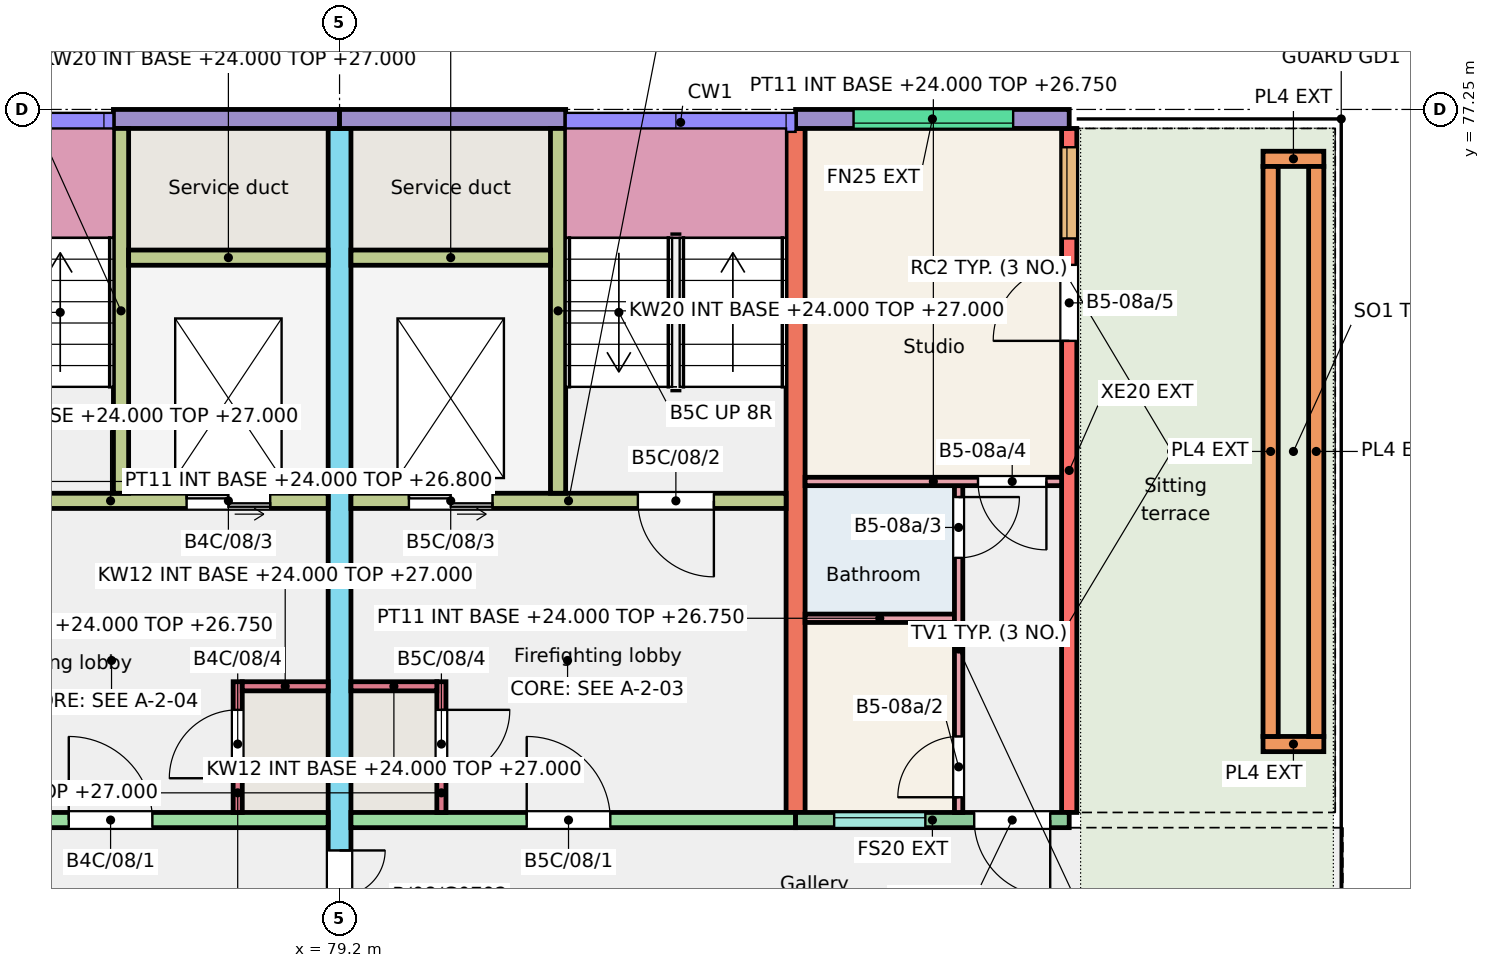
"""IFC4 building model, lengths in metres.
Left out: names, types, materials, properties, quantities, classifications, styles, units other than length and angle.
Written with IfcOpenShell. Run it as: python <this file> out.ifc"""

import sys

from ifc_helpers import new_model, si_unit, direction, frame, frame_2d, origin, place, context, subcontext, project, spatial, rectangle, extrude, element, fill, save


model = new_model("IFC4")
c1 = context("Model", 3, precision=1e-05, world=origin(), true_north=direction((0.0, 1.0)))
c2 = subcontext(c1, "Body", "Model", "MODEL_VIEW")
j1 = project(units=[si_unit("LENGTHUNIT", "METRE"), si_unit("PLANEANGLEUNIT", "RADIAN")], contexts=[c1])
p1 = place(None, origin())
s1 = spatial("IfcSite", under=j1, at=p1, CompositionType="ELEMENT")
p2 = place(p1, origin())
s2 = spatial("IfcBuilding", under=s1, at=p2, CompositionType="ELEMENT")
p3 = place(p2, frame((0.0, 0.0, 24.0)))
s3 = spatial("IfcBuildingStorey", under=s2, at=p3, CompositionType="ELEMENT", Elevation=24.0)
p4 = place(p3, frame((79.2, 66.0, 0.0), z_axis=(0.0, 0.0, 1.0), x_axis=(0.0, 1.0, 0.0)))
e1 = element("IfcWall", 1, at=p4, inside=s3, PredefinedType="SHEAR", context=c2, shape_type="SweptSolid", body=[
    extrude(rectangle(XDim=11.0, YDim=0.3, at=frame_2d((5.5, 0.0))), origin(), (0.0, 0.0, 1.0), 3.0),
])
p5 = place(p4, frame((0.3, 0.0, 0.0)))
e2 = element("IfcOpeningElement", 2, at=p5, cuts=e1, PredefinedType="OPENING", context=c2, shape_type="SweptSolid", body=[
    extrude(rectangle(XDim=1.2, YDim=2.1, at=frame_2d((0.6, 1.05))), frame((0.0, 0.16, 0.0), z_axis=(0.0, -1.0, 0.0), x_axis=(1.0, 0.0, 0.0)), (0.0, 0.0, 1.0), 0.32),
])
p6 = place(p3, frame((85.2, 68.0, 0.0), z_axis=(0.0, 0.0, 1.0), x_axis=(0.0, 1.0, 0.0)))
e3 = element("IfcWall", 3, at=p6, inside=s3, PredefinedType="SHEAR", context=c2, shape_type="SweptSolid", body=[
    extrude(rectangle(XDim=9.0, YDim=0.25, at=frame_2d((4.5, 0.0))), origin(), (0.0, 0.0, 1.0), 3.0),
])
p7 = place(p3, frame((88.8, 68.0, 0.0), z_axis=(0.0, 0.0, 1.0), x_axis=(0.0, 1.0, 0.0)))
e4 = element("IfcWall", 4, at=p7, inside=s3, PredefinedType="SHEAR", context=c2, shape_type="SweptSolid", body=[
    extrude(rectangle(XDim=9.0, YDim=0.2, at=frame_2d((4.5, 0.0))), origin(), (0.0, 0.0, 1.0), 3.0),
])
p8 = place(p7, frame((7.552, 0.0, 0.9)))
e5 = element("IfcOpeningElement", 5, at=p8, cuts=e4, PredefinedType="OPENING", context=c2, shape_type="SweptSolid", body=[
    extrude(rectangle(XDim=1.2, YDim=1.5, at=frame_2d((0.6, 0.75))), frame((0.0, 0.11, 0.0), z_axis=(0.0, -1.0, 0.0), x_axis=(1.0, 0.0, 0.0)), (0.0, 0.0, 1.0), 0.22),
])
p9 = place(p7, frame((6.205, 0.0, 0.0)))
e6 = element("IfcOpeningElement", 6, at=p9, cuts=e4, PredefinedType="OPENING", context=c2, shape_type="SweptSolid", body=[
    extrude(rectangle(XDim=1.0, YDim=2.1, at=frame_2d((0.5, 1.05))), frame((0.0, 0.11, 0.0), z_axis=(0.0, -1.0, 0.0), x_axis=(1.0, 0.0, 0.0)), (0.0, 0.0, 1.0), 0.22),
])
p10 = place(p3, frame((76.225, 77.125, 0.0), z_axis=(0.0, 0.0, 1.0), x_axis=(1.0, 0.0, 0.0)))
e7 = element("IfcWall", 7, at=p10, inside=s3, PredefinedType="SOLIDWALL", context=c2, shape_type="SweptSolid", body=[
    extrude(rectangle(XDim=2.975, YDim=0.25, at=frame_2d((1.487, 0.0))), origin(), (0.0, 0.0, 1.0), 3.0),
])
p11 = place(p3, frame((73.2, 67.9, 0.0), z_axis=(0.0, 0.0, 1.0), x_axis=(1.0, 0.0, 0.0)))
e8 = element("IfcWall", 8, at=p11, inside=s3, PredefinedType="SHEAR", context=c2, shape_type="SweptSolid", body=[
    extrude(rectangle(XDim=5.85, YDim=0.2, at=frame_2d((2.925, 0.0))), origin(), (0.0, 0.0, 1.0), 3.0),
])
p12 = place(p11, frame((2.438, 0.0, 0.0)))
e9 = element("IfcOpeningElement", 9, at=p12, cuts=e8, PredefinedType="OPENING", context=c2, shape_type="SweptSolid", body=[
    extrude(rectangle(XDim=1.1, YDim=2.1, at=frame_2d((0.55, 1.05))), frame((0.0, 0.11, 0.0), z_axis=(0.0, -1.0, 0.0), x_axis=(1.0, 0.0, 0.0)), (0.0, 0.0, 1.0), 0.22),
])
p13 = place(p3, frame((73.325, 72.1, 0.0), z_axis=(0.0, 0.0, 1.0), x_axis=(1.0, 0.0, 0.0)))
e10 = element("IfcWall", 10, at=p13, inside=s3, PredefinedType="SHEAR", context=c2, shape_type="SweptSolid", body=[
    extrude(rectangle(XDim=5.725, YDim=0.2, at=frame_2d((2.863, 0.0))), origin(), (0.0, 0.0, 1.0), 3.0),
])
p14 = place(p13, frame((0.95, 0.0, 0.0)))
e11 = element("IfcOpeningElement", 11, at=p14, cuts=e10, PredefinedType="OPENING", context=c2, shape_type="SweptSolid", body=[
    extrude(rectangle(XDim=1.0, YDim=2.1, at=frame_2d((0.5, 1.05))), frame((0.0, 0.11, 0.0), z_axis=(0.0, -1.0, 0.0), x_axis=(1.0, 0.0, 0.0)), (0.0, 0.0, 1.0), 0.22),
])
p15 = place(p13, frame((3.863, 0.0, 0.0)))
e12 = element("IfcOpeningElement", 12, at=p15, cuts=e10, PredefinedType="OPENING", context=c2, shape_type="SweptSolid", body=[
    extrude(rectangle(XDim=1.1, YDim=2.1, at=frame_2d((0.55, 1.05))), frame((0.0, 0.11, 0.0), z_axis=(0.0, -1.0, 0.0), x_axis=(1.0, 0.0, 0.0)), (0.0, 0.0, 1.0), 0.22),
])
p16 = place(p3, frame((76.325, 72.2, 0.0), z_axis=(0.0, 0.0, 1.0), x_axis=(0.0, 1.0, 0.0)))
e13 = element("IfcWall", 13, at=p16, inside=s3, PredefinedType="SHEAR", context=c2, shape_type="SweptSolid", body=[
    extrude(rectangle(XDim=4.8, YDim=0.2, at=frame_2d((2.4, 0.0))), origin(), (0.0, 0.0, 1.0), 3.0),
])
p17 = place(p3, frame((76.425, 75.3, 0.0), z_axis=(0.0, 0.0, 1.0), x_axis=(1.0, 0.0, 0.0)))
e14 = element("IfcWall", 14, at=p17, inside=s3, PredefinedType="SHEAR", context=c2, shape_type="SweptSolid", body=[
    extrude(rectangle(XDim=2.625, YDim=0.2, at=frame_2d((1.312, 0.0))), origin(), (0.0, 0.0, 1.0), 3.0),
])
p18 = place(p3, frame((77.86, 68.0, 0.0), z_axis=(0.0, 0.0, 1.0), x_axis=(0.0, 1.0, 0.0)))
e15 = element("IfcWall", 15, at=p18, inside=s3, PredefinedType="SHEAR", context=c2, shape_type="SweptSolid", body=[
    extrude(rectangle(XDim=1.72, YDim=0.12, at=frame_2d((0.86, 0.0))), origin(), (0.0, 0.0, 1.0), 3.0),
])
p19 = place(p18, frame((0.45, 0.0, 0.0)))
e16 = element("IfcOpeningElement", 16, at=p19, cuts=e15, PredefinedType="OPENING", context=c2, shape_type="SweptSolid", body=[
    extrude(rectangle(XDim=0.9, YDim=2.1, at=frame_2d((0.45, 1.05))), frame((0.0, 0.07, 0.0), z_axis=(0.0, -1.0, 0.0), x_axis=(1.0, 0.0, 0.0)), (0.0, 0.0, 1.0), 0.14),
])
p20 = place(p3, frame((77.92, 69.66, 0.0), z_axis=(0.0, 0.0, 1.0), x_axis=(1.0, 0.0, 0.0)))
e17 = element("IfcWall", 17, at=p20, inside=s3, PredefinedType="SHEAR", context=c2, shape_type="SweptSolid", body=[
    extrude(rectangle(XDim=1.13, YDim=0.12, at=frame_2d((0.565, 0.0))), origin(), (0.0, 0.0, 1.0), 3.0),
])
p21 = place(p3, frame((79.2, 77.125, 0.0), z_axis=(0.0, 0.0, 1.0), x_axis=(1.0, 0.0, 0.0)))
e18 = element("IfcWall", 18, at=p21, inside=s3, PredefinedType="SOLIDWALL", context=c2, shape_type="SweptSolid", body=[
    extrude(rectangle(XDim=2.975, YDim=0.25, at=frame_2d((1.488, 0.0))), origin(), (0.0, 0.0, 1.0), 3.0),
])
p22 = place(p3, frame((79.35, 67.9, 0.0), z_axis=(0.0, 0.0, 1.0), x_axis=(1.0, 0.0, 0.0)))
e19 = element("IfcWall", 19, at=p22, inside=s3, PredefinedType="SHEAR", context=c2, shape_type="SweptSolid", body=[
    extrude(rectangle(XDim=5.85, YDim=0.2, at=frame_2d((2.925, 0.0))), origin(), (0.0, 0.0, 1.0), 3.0),
])
p23 = place(p22, frame((2.312, 0.0, 0.0)))
e20 = element("IfcOpeningElement", 20, at=p23, cuts=e19, PredefinedType="OPENING", context=c2, shape_type="SweptSolid", body=[
    extrude(rectangle(XDim=1.1, YDim=2.1, at=frame_2d((0.55, 1.05))), frame((0.0, 0.11, 0.0), z_axis=(0.0, -1.0, 0.0), x_axis=(1.0, 0.0, 0.0)), (0.0, 0.0, 1.0), 0.22),
])
p24 = place(p3, frame((79.35, 72.1, 0.0), z_axis=(0.0, 0.0, 1.0), x_axis=(1.0, 0.0, 0.0)))
e21 = element("IfcWall", 21, at=p24, inside=s3, PredefinedType="SHEAR", context=c2, shape_type="SweptSolid", body=[
    extrude(rectangle(XDim=5.725, YDim=0.2, at=frame_2d((2.862, 0.0))), origin(), (0.0, 0.0, 1.0), 3.0),
])
p25 = place(p24, frame((3.775, 0.0, 0.0)))
e22 = element("IfcOpeningElement", 22, at=p25, cuts=e21, PredefinedType="OPENING", context=c2, shape_type="SweptSolid", body=[
    extrude(rectangle(XDim=1.0, YDim=2.1, at=frame_2d((0.5, 1.05))), frame((0.0, 0.11, 0.0), z_axis=(0.0, -1.0, 0.0), x_axis=(1.0, 0.0, 0.0)), (0.0, 0.0, 1.0), 0.22),
])
p26 = place(p24, frame((0.762, 0.0, 0.0)))
e23 = element("IfcOpeningElement", 23, at=p26, cuts=e21, PredefinedType="OPENING", context=c2, shape_type="SweptSolid", body=[
    extrude(rectangle(XDim=1.1, YDim=2.1, at=frame_2d((0.55, 1.05))), frame((0.0, 0.11, 0.0), z_axis=(0.0, -1.0, 0.0), x_axis=(1.0, 0.0, 0.0)), (0.0, 0.0, 1.0), 0.22),
])
p27 = place(p3, frame((82.075, 72.2, 0.0), z_axis=(0.0, 0.0, 1.0), x_axis=(0.0, 1.0, 0.0)))
e24 = element("IfcWall", 24, at=p27, inside=s3, PredefinedType="SHEAR", context=c2, shape_type="SweptSolid", body=[
    extrude(rectangle(XDim=4.8, YDim=0.2, at=frame_2d((2.4, 0.0))), origin(), (0.0, 0.0, 1.0), 3.0),
])
p28 = place(p3, frame((79.35, 75.3, 0.0), z_axis=(0.0, 0.0, 1.0), x_axis=(1.0, 0.0, 0.0)))
e25 = element("IfcWall", 25, at=p28, inside=s3, PredefinedType="SHEAR", context=c2, shape_type="SweptSolid", body=[
    extrude(rectangle(XDim=2.625, YDim=0.2, at=frame_2d((1.312, 0.0))), origin(), (0.0, 0.0, 1.0), 3.0),
])
p29 = place(p3, frame((80.54, 68.0, 0.0), z_axis=(0.0, 0.0, 1.0), x_axis=(0.0, 1.0, 0.0)))
e26 = element("IfcWall", 26, at=p29, inside=s3, PredefinedType="SHEAR", context=c2, shape_type="SweptSolid", body=[
    extrude(rectangle(XDim=1.72, YDim=0.12, at=frame_2d((0.86, 0.0))), origin(), (0.0, 0.0, 1.0), 3.0),
])
p30 = place(p29, frame((0.45, 0.0, 0.0)))
e27 = element("IfcOpeningElement", 27, at=p30, cuts=e26, PredefinedType="OPENING", context=c2, shape_type="SweptSolid", body=[
    extrude(rectangle(XDim=0.9, YDim=2.1, at=frame_2d((0.45, 1.05))), frame((0.0, 0.07, 0.0), z_axis=(0.0, -1.0, 0.0), x_axis=(1.0, 0.0, 0.0)), (0.0, 0.0, 1.0), 0.14),
])
p31 = place(p3, frame((79.35, 69.66, 0.0), z_axis=(0.0, 0.0, 1.0), x_axis=(1.0, 0.0, 0.0)))
e28 = element("IfcWall", 28, at=p31, inside=s3, PredefinedType="SHEAR", context=c2, shape_type="SweptSolid", body=[
    extrude(rectangle(XDim=1.13, YDim=0.12, at=frame_2d((0.565, 0.0))), origin(), (0.0, 0.0, 1.0), 3.0),
])
p32 = place(p3, frame((85.2, 77.125, 0.0), z_axis=(0.0, 0.0, 1.0), x_axis=(1.0, 0.0, 0.0)))
e29 = element("IfcWall", 29, at=p32, inside=s3, PredefinedType="SOLIDWALL", context=c2, shape_type="SweptSolid", body=[
    extrude(rectangle(XDim=3.6, YDim=0.25, at=frame_2d((1.8, 0.0))), origin(), (0.0, 0.0, 1.0), 3.0),
])
p33 = place(p32, frame((0.762, 0.0, 1.2)))
e30 = element("IfcOpeningElement", 30, at=p33, cuts=e29, PredefinedType="OPENING", context=c2, shape_type="SweptSolid", body=[
    extrude(rectangle(XDim=2.1, YDim=1.2, at=frame_2d((1.05, 0.6))), frame((0.0, 0.135, 0.0), z_axis=(0.0, -1.0, 0.0), x_axis=(1.0, 0.0, 0.0)), (0.0, 0.0, 1.0), 0.27),
])
p34 = place(p3, frame((85.2, 67.9, 0.0), z_axis=(0.0, 0.0, 1.0), x_axis=(1.0, 0.0, 0.0)))
e31 = element("IfcWall", 31, at=p34, inside=s3, PredefinedType="SOLIDWALL", context=c2, shape_type="SweptSolid", body=[
    extrude(rectangle(XDim=3.6, YDim=0.2, at=frame_2d((1.8, 0.0))), origin(), (0.0, 0.0, 1.0), 3.0),
])
p35 = place(p34, frame((0.508, 0.0, 1.1)))
e32 = element("IfcOpeningElement", 32, at=p35, cuts=e31, PredefinedType="OPENING", context=c2, shape_type="SweptSolid", body=[
    extrude(rectangle(XDim=1.2, YDim=1.3, at=frame_2d((0.6, 0.65))), frame((0.0, 0.11, 0.0), z_axis=(0.0, -1.0, 0.0), x_axis=(1.0, 0.0, 0.0)), (0.0, 0.0, 1.0), 0.22),
])
p36 = place(p34, frame((2.35, 0.0, 0.0)))
e33 = element("IfcOpeningElement", 33, at=p36, cuts=e31, PredefinedType="OPENING", context=c2, shape_type="SweptSolid", body=[
    extrude(rectangle(XDim=1.0, YDim=2.1, at=frame_2d((0.5, 1.05))), frame((0.0, 0.11, 0.0), z_axis=(0.0, -1.0, 0.0), x_axis=(1.0, 0.0, 0.0)), (0.0, 0.0, 1.0), 0.22),
])
for number, where, z_axis, x_axis in (
    (34, (91.35, 68.9, 0.01), (0.0, 0.0, 1.0), (1.0, 0.0, 0.0)),
    (35, (91.35, 76.6, 0.01), (0.0, 0.0, 1.0), (1.0, 0.0, 0.0)),
):
    element("IfcWall", number, at=place(p3, frame(where, z_axis=z_axis, x_axis=x_axis)), inside=s3, PredefinedType="SOLIDWALL", context=c2, shape_type="SweptSolid", body=[
        extrude(rectangle(XDim=0.8, YDim=0.2, at=frame_2d((0.4, 0.0))), origin(), (0.0, 0.0, 1.0), 0.45),
    ])
for number, where, z_axis, x_axis in (
    (36, (91.45, 69.0, 0.01), (0.0, 0.0, 1.0), (0.0, 1.0, 0.0)),
    (37, (92.05, 69.0, 0.01), (0.0, 0.0, 1.0), (0.0, 1.0, 0.0)),
):
    element("IfcWall", number, at=place(p3, frame(where, z_axis=z_axis, x_axis=x_axis)), inside=s3, PredefinedType="SOLIDWALL", context=c2, shape_type="SweptSolid", body=[
        extrude(rectangle(XDim=7.5, YDim=0.2, at=frame_2d((3.75, 0.0))), origin(), (0.0, 0.0, 1.0), 0.45),
    ])
p37 = place(p3, frame((85.325, 70.555, 0.0), z_axis=(0.0, 0.0, 1.0), x_axis=(1.0, 0.0, 0.0)))
e38 = element("IfcWall", 38, at=p37, inside=s3, PredefinedType="PARTITIONING", context=c2, shape_type="SweptSolid", body=[
    extrude(rectangle(XDim=1.965, YDim=0.11, at=frame_2d((0.982, 0.0))), origin(), (0.0, 0.0, 1.0), 2.75),
])
p38 = place(p3, frame((87.345, 68.0, 0.0), z_axis=(0.0, 0.0, 1.0), x_axis=(0.0, 1.0, 0.0)))
e39 = element("IfcWall", 39, at=p38, inside=s3, PredefinedType="PARTITIONING", context=c2, shape_type="SweptSolid", body=[
    extrude(rectangle(XDim=4.3, YDim=0.11, at=frame_2d((2.15, 0.0))), origin(), (0.0, 0.0, 1.0), 2.75),
])
p39 = place(p38, frame((0.2, 0.0, 0.0)))
e40 = element("IfcOpeningElement", 40, at=p39, cuts=e39, PredefinedType="OPENING", context=c2, shape_type="SweptSolid", body=[
    extrude(rectangle(XDim=0.8, YDim=2.1, at=frame_2d((0.4, 1.05))), frame((0.0, 0.065, 0.0), z_axis=(0.0, -1.0, 0.0), x_axis=(1.0, 0.0, 0.0)), (0.0, 0.0, 1.0), 0.13),
])
p40 = place(p38, frame((3.35, 0.0, 0.0)))
e41 = element("IfcOpeningElement", 41, at=p40, cuts=e39, PredefinedType="OPENING", context=c2, shape_type="SweptSolid", body=[
    extrude(rectangle(XDim=0.8, YDim=2.1, at=frame_2d((0.4, 1.05))), frame((0.0, 0.065, 0.0), z_axis=(0.0, -1.0, 0.0), x_axis=(1.0, 0.0, 0.0)), (0.0, 0.0, 1.0), 0.13),
])
p41 = place(p3, frame((85.325, 72.355, 0.0), z_axis=(0.0, 0.0, 1.0), x_axis=(1.0, 0.0, 0.0)))
e42 = element("IfcWall", 42, at=p41, inside=s3, PredefinedType="PARTITIONING", context=c2, shape_type="SweptSolid", body=[
    extrude(rectangle(XDim=3.375, YDim=0.11, at=frame_2d((1.688, 0.0))), origin(), (0.0, 0.0, 1.0), 2.75),
])
p42 = place(p41, frame((2.275, 0.0, 0.0)))
e43 = element("IfcOpeningElement", 43, at=p42, cuts=e42, PredefinedType="OPENING", context=c2, shape_type="SweptSolid", body=[
    extrude(rectangle(XDim=0.9, YDim=2.1, at=frame_2d((0.45, 1.05))), frame((0.0, 0.065, 0.0), z_axis=(0.0, -1.0, 0.0), x_axis=(1.0, 0.0, 0.0)), (0.0, 0.0, 1.0), 0.13),
])
p43 = place(p35, origin())
e44 = element("IfcWindow", 44, at=p43, inside=s3, PartitioningType="SINGLE_PANEL", PredefinedType="WINDOW", context=c2, shape_type="SweptSolid", body=[
    extrude(rectangle(XDim=1.2, YDim=1.3, at=frame_2d((0.6, 0.65))), frame((0.0, 0.06, 0.0), z_axis=(0.0, -1.0, 0.0), x_axis=(1.0, 0.0, 0.0)), (0.0, 0.0, 1.0), 0.06),
])
fill(e32, e44)
p44 = place(p33, origin())
e45 = element("IfcWindow", 45, at=p44, inside=s3, PartitioningType="SINGLE_PANEL", PredefinedType="WINDOW", context=c2, shape_type="SweptSolid", body=[
    extrude(rectangle(XDim=2.1, YDim=1.2, at=frame_2d((1.05, 0.6))), frame((0.0, -0.025, 0.0), z_axis=(0.0, -1.0, 0.0), x_axis=(1.0, 0.0, 0.0)), (0.0, 0.0, 1.0), 0.06),
])
fill(e30, e45)
p45 = place(p8, origin())
e46 = element("IfcWindow", 46, at=p45, inside=s3, PartitioningType="SINGLE_PANEL", PredefinedType="WINDOW", context=c2, shape_type="SweptSolid", body=[
    extrude(rectangle(XDim=1.2, YDim=1.5, at=frame_2d((0.6, 0.75))), frame((0.0, 0.06, 0.0), z_axis=(0.0, -1.0, 0.0), x_axis=(1.0, 0.0, 0.0)), (0.0, 0.0, 1.0), 0.06),
])
fill(e5, e46)
p46 = place(p36, origin())
e47 = element("IfcDoor", 47, at=p46, inside=s3, OperationType="SINGLE_SWING_RIGHT", PredefinedType="DOOR", context=c2, shape_type="SweptSolid", body=[
    extrude(rectangle(XDim=1.0, YDim=2.1, at=frame_2d((0.5, 1.05))), frame((0.0, 0.025, 0.0), z_axis=(0.0, -1.0, 0.0), x_axis=(1.0, 0.0, 0.0)), (0.0, 0.0, 1.0), 0.05),
])
fill(e33, e47)
p47 = place(p39, origin())
e48 = element("IfcDoor", 48, at=p47, inside=s3, OperationType="SINGLE_SWING_LEFT", PredefinedType="DOOR", context=c2, shape_type="SweptSolid", body=[
    extrude(rectangle(XDim=0.8, YDim=2.1, at=frame_2d((0.4, 1.05))), frame((0.0, 0.025, 0.0), z_axis=(0.0, -1.0, 0.0), x_axis=(1.0, 0.0, 0.0)), (0.0, 0.0, 1.0), 0.05),
])
fill(e40, e48)
p48 = place(p40, origin())
e49 = element("IfcDoor", 49, at=p48, inside=s3, OperationType="SINGLE_SWING_RIGHT", PredefinedType="DOOR", context=c2, shape_type="SweptSolid", body=[
    extrude(rectangle(XDim=0.8, YDim=2.1, at=frame_2d((0.4, 1.05))), frame((0.0, 0.025, 0.0), z_axis=(0.0, -1.0, 0.0), x_axis=(1.0, 0.0, 0.0)), (0.0, 0.0, 1.0), 0.05),
])
fill(e41, e49)
p49 = place(p42, origin())
e50 = element("IfcDoor", 50, at=p49, inside=s3, OperationType="SINGLE_SWING_RIGHT", PredefinedType="DOOR", context=c2, shape_type="SweptSolid", body=[
    extrude(rectangle(XDim=0.9, YDim=2.1, at=frame_2d((0.45, 1.05))), frame((0.0, 0.025, 0.0), z_axis=(0.0, -1.0, 0.0), x_axis=(1.0, 0.0, 0.0)), (0.0, 0.0, 1.0), 0.05),
])
fill(e43, e50)
p50 = place(p9, origin())
e51 = element("IfcDoor", 51, at=p50, inside=s3, OperationType="SINGLE_SWING_LEFT", PredefinedType="DOOR", context=c2, shape_type="SweptSolid", body=[
    extrude(rectangle(XDim=1.0, YDim=2.1, at=frame_2d((0.5, 1.05))), frame((0.0, 0.025, 0.0), z_axis=(0.0, -1.0, 0.0), x_axis=(1.0, 0.0, 0.0)), (0.0, 0.0, 1.0), 0.05),
])
fill(e6, e51)
p51 = place(p12, origin())
e52 = element("IfcDoor", 52, at=p51, inside=s3, OperationType="SINGLE_SWING_LEFT", PredefinedType="DOOR", context=c2, shape_type="SweptSolid", body=[
    extrude(rectangle(XDim=1.1, YDim=2.1, at=frame_2d((0.55, 1.05))), frame((0.0, 0.025, 0.0), z_axis=(0.0, -1.0, 0.0), x_axis=(1.0, 0.0, 0.0)), (0.0, 0.0, 1.0), 0.05),
])
fill(e9, e52)
p52 = place(p15, origin())
e53 = element("IfcDoor", 53, at=p52, inside=s3, OperationType="DOUBLE_DOOR_SLIDING", PredefinedType="DOOR", context=c2, shape_type="SweptSolid", body=[
    extrude(rectangle(XDim=1.1, YDim=2.1, at=frame_2d((0.55, 1.05))), frame((0.0, 0.025, 0.0), z_axis=(0.0, -1.0, 0.0), x_axis=(1.0, 0.0, 0.0)), (0.0, 0.0, 1.0), 0.05),
])
fill(e12, e53)
p53 = place(p19, origin())
e54 = element("IfcDoor", 54, at=p53, inside=s3, OperationType="SINGLE_SWING_LEFT", PredefinedType="DOOR", context=c2, shape_type="SweptSolid", body=[
    extrude(rectangle(XDim=0.9, YDim=2.1, at=frame_2d((0.45, 1.05))), frame((0.0, 0.025, 0.0), z_axis=(0.0, -1.0, 0.0), x_axis=(1.0, 0.0, 0.0)), (0.0, 0.0, 1.0), 0.05),
])
fill(e16, e54)
p54 = place(p23, origin())
e55 = element("IfcDoor", 55, at=p54, inside=s3, OperationType="SINGLE_SWING_LEFT", PredefinedType="DOOR", context=c2, shape_type="SweptSolid", body=[
    extrude(rectangle(XDim=1.1, YDim=2.1, at=frame_2d((0.55, 1.05))), frame((0.0, 0.025, 0.0), z_axis=(0.0, -1.0, 0.0), x_axis=(1.0, 0.0, 0.0)), (0.0, 0.0, 1.0), 0.05),
])
fill(e20, e55)
p55 = place(p25, origin())
e56 = element("IfcDoor", 56, at=p55, inside=s3, OperationType="SINGLE_SWING_RIGHT", PredefinedType="DOOR", context=c2, shape_type="SweptSolid", body=[
    extrude(rectangle(XDim=1.0, YDim=2.1, at=frame_2d((0.5, 1.05))), frame((0.0, 0.025, 0.0), z_axis=(0.0, -1.0, 0.0), x_axis=(1.0, 0.0, 0.0)), (0.0, 0.0, 1.0), 0.05),
])
fill(e22, e56)
p56 = place(p26, origin())
e57 = element("IfcDoor", 57, at=p56, inside=s3, OperationType="DOUBLE_DOOR_SLIDING", PredefinedType="DOOR", context=c2, shape_type="SweptSolid", body=[
    extrude(rectangle(XDim=1.1, YDim=2.1, at=frame_2d((0.55, 1.05))), frame((0.0, 0.025, 0.0), z_axis=(0.0, -1.0, 0.0), x_axis=(1.0, 0.0, 0.0)), (0.0, 0.0, 1.0), 0.05),
])
fill(e23, e57)
p57 = place(p30, origin())
e58 = element("IfcDoor", 58, at=p57, inside=s3, OperationType="SINGLE_SWING_RIGHT", PredefinedType="DOOR", context=c2, shape_type="SweptSolid", body=[
    extrude(rectangle(XDim=0.9, YDim=2.1, at=frame_2d((0.45, 1.05))), frame((0.0, 0.025, 0.0), z_axis=(0.0, -1.0, 0.0), x_axis=(1.0, 0.0, 0.0)), (0.0, 0.0, 1.0), 0.05),
])
fill(e27, e58)
p58 = place(p5, origin())
e59 = element("IfcDoor", 59, at=p58, inside=s3, OperationType="DOUBLE_DOOR_SINGLE_SWING", PredefinedType="DOOR", context=c2, shape_type="SweptSolid", body=[
    extrude(rectangle(XDim=1.2, YDim=2.1, at=frame_2d((0.6, 1.05))), frame((0.0, 0.025, 0.0), z_axis=(0.0, -1.0, 0.0), x_axis=(1.0, 0.0, 0.0)), (0.0, 0.0, 1.0), 0.05),
])
fill(e2, e59)
save(model, sys.argv[1])
